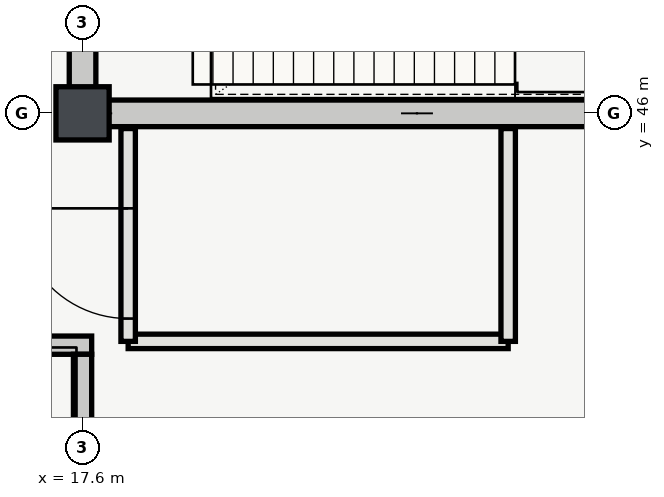
"""IFC4 building model, lengths in metres.
Left out: names, types, materials, properties, quantities, classifications, styles, units other than length and angle.
Written with IfcOpenShell. Run it as: python <this file> out.ifc"""

import sys

from ifc_helpers import new_model, si_unit, direction, frame, frame_2d, origin, origin_2d, place, context, subcontext, project, spatial, rectangle, extrude, element, fill, save


model = new_model("IFC4")
c1 = context("Model", 3, precision=1e-05, world=origin(), true_north=direction((0.0, 1.0)))
c2 = subcontext(c1, "Body", "Model", "MODEL_VIEW")
j1 = project(units=[si_unit("LENGTHUNIT", "METRE"), si_unit("PLANEANGLEUNIT", "RADIAN")], contexts=[c1])
p1 = place(None, origin())
s1 = spatial("IfcSite", under=j1, at=p1, CompositionType="ELEMENT")
p2 = place(p1, origin())
s2 = spatial("IfcBuilding", under=s1, at=p2, CompositionType="ELEMENT")
p3 = place(p2, origin())
s3 = spatial("IfcBuildingStorey", under=s2, at=p3, CompositionType="ELEMENT", Elevation=0.0)
p4 = place(p3, frame((17.6, 46.0, 0.0), z_axis=(0.0, 0.0, 1.0), x_axis=(1.0, 0.0, 0.0)))
e1 = element("IfcColumn", 1, at=p4, inside=s3, PredefinedType="COLUMN", context=c2, shape_type="SweptSolid", body=[
    extrude(rectangle(XDim=0.7, YDim=0.7, at=origin_2d()), origin(), (0.0, 0.0, 1.0), 5.4),
])
p5 = place(p3, frame((17.425, 46.0, 0.0), z_axis=(0.0, 0.0, 1.0), x_axis=(1.0, 0.0, 0.0)))
e2 = element("IfcWall", 2, at=p5, inside=s3, PredefinedType="SHEAR", context=c2, shape_type="SweptSolid", body=[
    extrude(rectangle(XDim=9.15, YDim=0.35, at=frame_2d((4.575, 0.0))), origin(), (0.0, 0.0, 1.0), 5.12),
])
p6 = place(p3, frame((17.6, 46.175, 0.0), z_axis=(0.0, 0.0, 1.0), x_axis=(0.0, 1.0, 0.0)))
e3 = element("IfcWall", 3, at=p6, inside=s3, PredefinedType="SHEAR", context=c2, shape_type="SweptSolid", body=[
    extrude(rectangle(XDim=7.65, YDim=0.35, at=frame_2d((3.825, 0.0))), origin(), (0.0, 0.0, 1.0), 5.12),
])
p7 = place(p6, frame((1.65, 0.0, 0.0)))
e4 = element("IfcOpeningElement", 4, at=p7, cuts=e3, PredefinedType="OPENING", context=c2, shape_type="SweptSolid", body=[
    extrude(rectangle(XDim=1.35, YDim=2.2, at=frame_2d((0.675, 1.1))), frame((0.0, 0.185, 0.0), z_axis=(0.0, -1.0, 0.0), x_axis=(1.0, 0.0, 0.0)), (0.0, 0.0, 1.0), 0.37),
])
p8 = place(p3, frame((18.2, 43.0, 0.0), z_axis=(0.0, 0.0, 1.0), x_axis=(1.0, 0.0, 0.0)))
e5 = element("IfcWall", 5, at=p8, inside=s3, PredefinedType="PARTITIONING", context=c2, shape_type="SweptSolid", body=[
    extrude(rectangle(XDim=5.0, YDim=0.19, at=frame_2d((2.5, 0.0))), origin(), (0.0, 0.0, 1.0), 5.12),
])
p9 = place(p3, frame((18.2, 45.8, 0.0), z_axis=(0.0, 0.0, 1.0), x_axis=(0.0, -1.0, 0.0)))
e6 = element("IfcWall", 6, at=p9, inside=s3, PredefinedType="PARTITIONING", context=c2, shape_type="SweptSolid", body=[
    extrude(rectangle(XDim=2.8, YDim=0.19, at=frame_2d((1.4, 0.0))), origin(), (0.0, 0.0, 1.0), 5.12),
])
p10 = place(p9, frame((1.05, 0.0, 0.0)))
e7 = element("IfcOpeningElement", 7, at=p10, cuts=e6, PredefinedType="OPENING", context=c2, shape_type="SweptSolid", body=[
    extrude(rectangle(XDim=1.45, YDim=2.2, at=frame_2d((0.725, 1.1))), frame((0.0, 0.105, 0.0), z_axis=(0.0, -1.0, 0.0), x_axis=(1.0, 0.0, 0.0)), (0.0, 0.0, 1.0), 0.21),
])
p11 = place(p3, frame((23.2, 43.0, 0.0), z_axis=(0.0, 0.0, 1.0), x_axis=(0.0, 1.0, 0.0)))
e8 = element("IfcWall", 8, at=p11, inside=s3, PredefinedType="PARTITIONING", context=c2, shape_type="SweptSolid", body=[
    extrude(rectangle(XDim=2.8, YDim=0.19, at=frame_2d((1.4, 0.0))), origin(), (0.0, 0.0, 1.0), 5.12),
])
p12 = place(p3, frame((17.72, 42.95, 0.0), z_axis=(0.0, 0.0, 1.0), x_axis=(-1.0, 0.0, 0.0)))
e9 = element("IfcWall", 9, at=p12, inside=s3, PredefinedType="SHEAR", context=c2, shape_type="SweptSolid", body=[
    extrude(rectangle(XDim=9.04, YDim=0.24, at=frame_2d((4.52, 0.0))), origin(), (0.0, 0.0, 1.0), 5.12),
])
p13 = place(p3, frame((17.6, 38.67, 0.0), z_axis=(0.0, 0.0, 1.0), x_axis=(0.0, 1.0, 0.0)))
e10 = element("IfcWall", 10, at=p13, inside=s3, PredefinedType="SHEAR", context=c2, shape_type="SweptSolid", body=[
    extrude(rectangle(XDim=4.16, YDim=0.24, at=frame_2d((2.08, 0.0))), origin(), (0.0, 0.0, 1.0), 5.12),
])
p14 = place(p10, origin())
e11 = element("IfcDoor", 11, at=p14, inside=s3, OperationType="SINGLE_SWING_LEFT", PredefinedType="DOOR", context=c2, shape_type="SweptSolid", body=[
    extrude(rectangle(XDim=1.45, YDim=2.2, at=frame_2d((0.725, 1.1))), frame((0.0, 0.025, 0.0), z_axis=(0.0, -1.0, 0.0), x_axis=(1.0, 0.0, 0.0)), (0.0, 0.0, 1.0), 0.05),
])
fill(e7, e11)
save(model, sys.argv[1])
